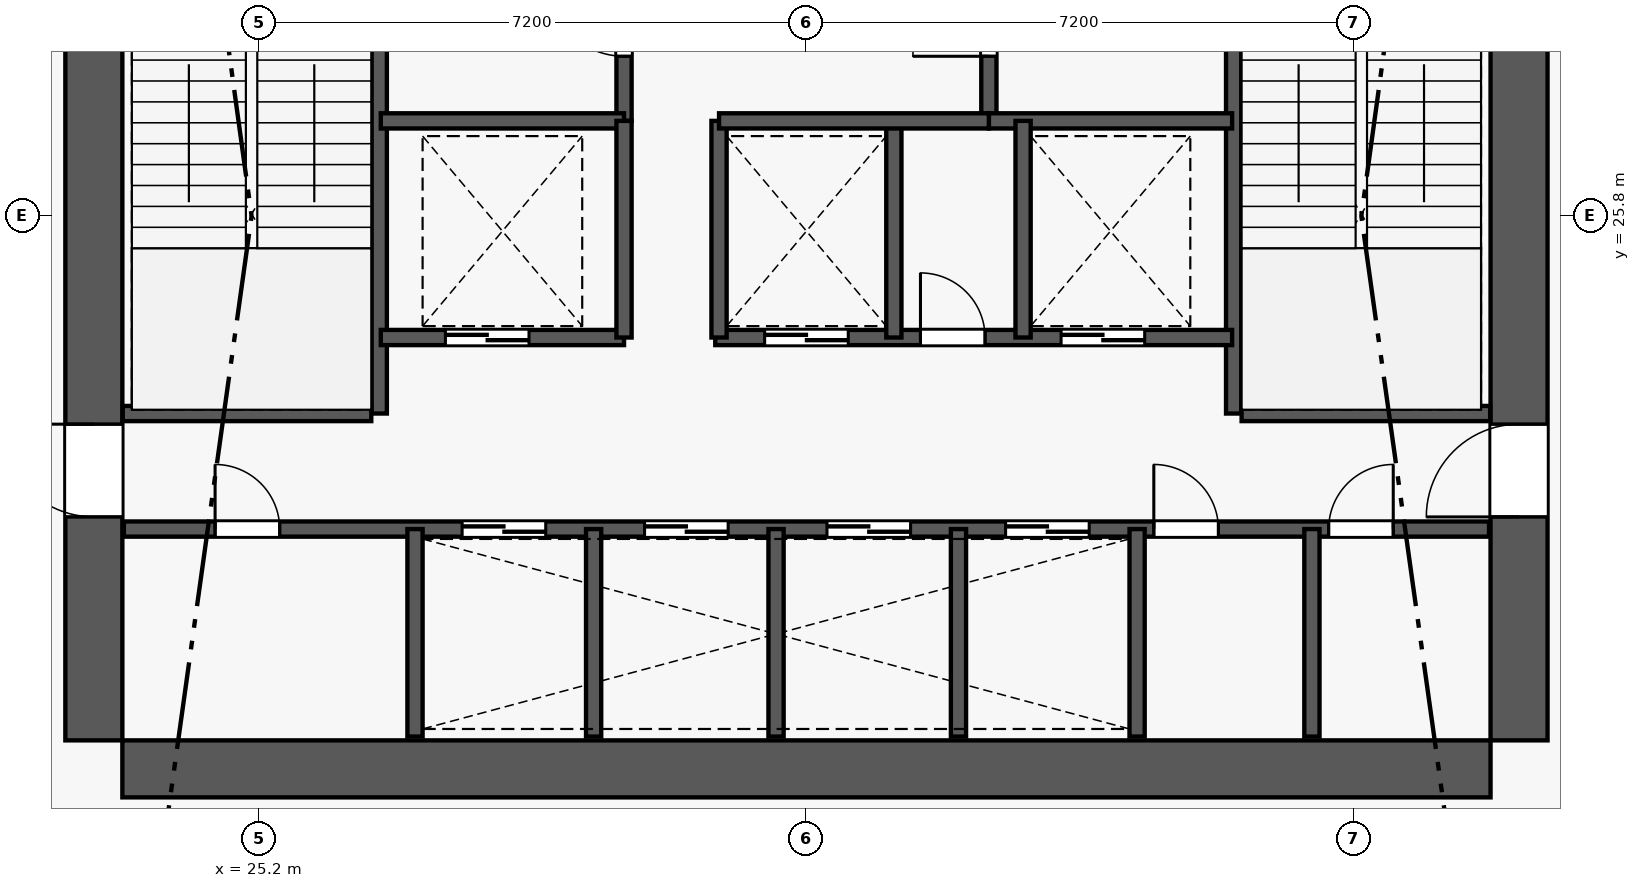
"""IFC4 building model, lengths in metres.
Left out: names, types, materials, properties, quantities, classifications, styles, units other than length and angle.
Written with IfcOpenShell. Run it as: python <this file> out.ifc"""

import sys

from ifc_helpers import new_model, si_unit, direction, frame, frame_2d, origin, origin_2d, place, context, subcontext, project, spatial, rectangle, extrude, element, fill, save


model = new_model("IFC4")
c1 = context("Model", 3, precision=1e-05, world=origin(), true_north=direction((0.0, 1.0)))
c2 = subcontext(c1, "Body", "Model", "MODEL_VIEW")
j1 = project(units=[si_unit("LENGTHUNIT", "METRE"), si_unit("PLANEANGLEUNIT", "RADIAN")], contexts=[c1])
p1 = place(None, origin())
s1 = spatial("IfcSite", under=j1, at=p1, CompositionType="ELEMENT")
p2 = place(p1, origin())
s2 = spatial("IfcBuilding", under=s1, at=p2, CompositionType="ELEMENT")
p3 = place(p2, frame((0.0, 0.0, 94.2)))
s3 = spatial("IfcBuildingStorey", under=s2, at=p3, CompositionType="ELEMENT", Elevation=94.2)
for number, where, z_axis, x_axis in (
    (1, (23.025, 18.525, 0.0), (0.0, 0.0, 1.0), (1.0, 0.0, 0.0)),
    (2, (41.775, 18.525, 0.0), (0.0, 0.0, 1.0), (1.0, 0.0, 0.0)),
):
    element("IfcColumn", number, at=place(p3, frame(where, z_axis=z_axis, x_axis=x_axis)), inside=s3, PredefinedType="COLUMN", context=c2, shape_type="SweptSolid", body=[
        extrude(rectangle(XDim=0.75, YDim=0.75, at=origin_2d()), origin(), (0.0, 0.0, 1.0), 4.2),
    ])
p4 = place(p3, frame((23.4, 18.525, 0.0), z_axis=(0.0, 0.0, 1.0), x_axis=(1.0, 0.0, 0.0)))
e3 = element("IfcWall", 3, at=p4, inside=s3, PredefinedType="SHEAR", context=c2, shape_type="SweptSolid", body=[
    extrude(rectangle(XDim=18.0, YDim=0.75, at=frame_2d((9.0, 0.0))), origin(), (0.0, 0.0, 1.0), 3.99),
])
p5 = place(p3, frame((23.025, 18.9, 0.0), z_axis=(0.0, 0.0, 1.0), x_axis=(0.0, 1.0, 0.0)))
e4 = element("IfcWall", 4, at=p5, inside=s3, PredefinedType="SHEAR", context=c2, shape_type="SweptSolid", body=[
    extrude(rectangle(XDim=14.0, YDim=0.75, at=frame_2d((7.0, 0.0))), origin(), (0.0, 0.0, 1.0), 3.99),
])
p6 = place(p5, frame((2.94, 0.0, 0.0)))
e5 = element("IfcOpeningElement", 5, at=p6, cuts=e4, PredefinedType="OPENING", context=c2, shape_type="SweptSolid", body=[
    extrude(rectangle(XDim=1.22, YDim=2.25, at=frame_2d((0.61, 1.125))), frame((0.0, 0.385, 0.0), z_axis=(0.0, -1.0, 0.0), x_axis=(1.0, 0.0, 0.0)), (0.0, 0.0, 1.0), 0.77),
])
p7 = place(p3, frame((41.775, 18.9, 0.0), z_axis=(0.0, 0.0, 1.0), x_axis=(0.0, 1.0, 0.0)))
e6 = element("IfcWall", 6, at=p7, inside=s3, PredefinedType="SHEAR", context=c2, shape_type="SweptSolid", body=[
    extrude(rectangle(XDim=14.0, YDim=0.75, at=frame_2d((7.0, 0.0))), origin(), (0.0, 0.0, 1.0), 3.99),
])
p8 = place(p7, frame((2.94, 0.0, 0.0)))
e7 = element("IfcOpeningElement", 7, at=p8, cuts=e6, PredefinedType="OPENING", context=c2, shape_type="SweptSolid", body=[
    extrude(rectangle(XDim=1.22, YDim=2.25, at=frame_2d((0.61, 1.125))), frame((0.0, 0.385, 0.0), z_axis=(0.0, -1.0, 0.0), x_axis=(1.0, 0.0, 0.0)), (0.0, 0.0, 1.0), 0.77),
])
p9 = place(p3, frame((26.78, 23.2, 0.0), z_axis=(0.0, 0.0, 1.0), x_axis=(0.0, 1.0, 0.0)))
e8 = element("IfcWall", 8, at=p9, inside=s3, PredefinedType="SHEAR", context=c2, shape_type="SweptSolid", body=[
    extrude(rectangle(XDim=6.78, YDim=0.2, at=frame_2d((3.39, 0.0))), origin(), (0.0, 0.0, 1.0), 4.2),
])
p10 = place(p9, frame((5.32, 0.0, 0.0)))
e9 = element("IfcOpeningElement", 9, at=p10, cuts=e8, PredefinedType="OPENING", context=c2, shape_type="SweptSolid", body=[
    extrude(rectangle(XDim=1.05, YDim=2.15, at=frame_2d((0.525, 1.075))), frame((0.0, 0.11, 0.0), z_axis=(0.0, -1.0, 0.0), x_axis=(1.0, 0.0, 0.0)), (0.0, 0.0, 1.0), 0.22),
])
p11 = place(p3, frame((23.405, 23.2, 0.0), z_axis=(0.0, 0.0, 1.0), x_axis=(1.0, 0.0, 0.0)))
e10 = element("IfcWall", 10, at=p11, inside=s3, PredefinedType="PLUMBINGWALL", context=c2, shape_type="SweptSolid", body=[
    extrude(rectangle(XDim=3.27, YDim=0.2, at=frame_2d((1.635, 0.0))), origin(), (0.0, 0.0, 1.0), 3.99),
])
p12 = place(p3, frame((38.02, 23.2, 0.0), z_axis=(0.0, 0.0, 1.0), x_axis=(0.0, 1.0, 0.0)))
e11 = element("IfcWall", 11, at=p12, inside=s3, PredefinedType="SHEAR", context=c2, shape_type="SweptSolid", body=[
    extrude(rectangle(XDim=6.78, YDim=0.2, at=frame_2d((3.39, 0.0))), origin(), (0.0, 0.0, 1.0), 4.2),
])
p13 = place(p12, frame((5.32, 0.0, 0.0)))
e12 = element("IfcOpeningElement", 12, at=p13, cuts=e11, PredefinedType="OPENING", context=c2, shape_type="SweptSolid", body=[
    extrude(rectangle(XDim=1.05, YDim=2.15, at=frame_2d((0.525, 1.075))), frame((0.0, 0.11, 0.0), z_axis=(0.0, -1.0, 0.0), x_axis=(1.0, 0.0, 0.0)), (0.0, 0.0, 1.0), 0.22),
])
p14 = place(p3, frame((38.125, 23.2, 0.0), z_axis=(0.0, 0.0, 1.0), x_axis=(1.0, 0.0, 0.0)))
e13 = element("IfcWall", 13, at=p14, inside=s3, PredefinedType="PLUMBINGWALL", context=c2, shape_type="SweptSolid", body=[
    extrude(rectangle(XDim=3.27, YDim=0.2, at=frame_2d((1.635, 0.0))), origin(), (0.0, 0.0, 1.0), 3.99),
])
p15 = place(p3, frame((30.0, 27.05, 0.0), z_axis=(0.0, 0.0, 1.0), x_axis=(0.0, 1.0, 0.0)))
e14 = element("IfcWall", 14, at=p15, inside=s3, PredefinedType="PLUMBINGWALL", context=c2, shape_type="SweptSolid", body=[
    extrude(rectangle(XDim=2.75, YDim=0.2, at=frame_2d((1.375, 0.0))), origin(), (0.0, 0.0, 1.0), 3.99),
])
p16 = place(p15, frame((0.85, 0.0, 0.0)))
e15 = element("IfcOpeningElement", 15, at=p16, cuts=e14, PredefinedType="OPENING", context=c2, shape_type="SweptSolid", body=[
    extrude(rectangle(XDim=1.0, YDim=2.15, at=frame_2d((0.5, 1.075))), frame((0.0, 0.11, 0.0), z_axis=(0.0, -1.0, 0.0), x_axis=(1.0, 0.0, 0.0)), (0.0, 0.0, 1.0), 0.22),
])
p17 = place(p3, frame((26.8, 27.05, 0.0), z_axis=(0.0, 0.0, 1.0), x_axis=(1.0, 0.0, 0.0)))
e16 = element("IfcWall", 16, at=p17, inside=s3, PredefinedType="PLUMBINGWALL", context=c2, shape_type="SweptSolid", body=[
    extrude(rectangle(XDim=3.2, YDim=0.2, at=frame_2d((1.6, 0.0))), origin(), (0.0, 0.0, 1.0), 3.99),
])
p18 = place(p3, frame((34.8, 27.05, 0.0), z_axis=(0.0, 0.0, 1.0), x_axis=(0.0, 1.0, 0.0)))
e17 = element("IfcWall", 17, at=p18, inside=s3, PredefinedType="PLUMBINGWALL", context=c2, shape_type="SweptSolid", body=[
    extrude(rectangle(XDim=2.75, YDim=0.2, at=frame_2d((1.375, 0.0))), origin(), (0.0, 0.0, 1.0), 3.99),
])
p19 = place(p18, frame((0.85, 0.0, 0.0)))
e18 = element("IfcOpeningElement", 18, at=p19, cuts=e17, PredefinedType="OPENING", context=c2, shape_type="SweptSolid", body=[
    extrude(rectangle(XDim=1.0, YDim=2.15, at=frame_2d((0.5, 1.075))), frame((0.0, 0.11, 0.0), z_axis=(0.0, -1.0, 0.0), x_axis=(1.0, 0.0, 0.0)), (0.0, 0.0, 1.0), 0.22),
])
p20 = place(p3, frame((34.8, 27.05, 0.0), z_axis=(0.0, 0.0, 1.0), x_axis=(1.0, 0.0, 0.0)))
e19 = element("IfcWall", 19, at=p20, inside=s3, PredefinedType="PLUMBINGWALL", context=c2, shape_type="SweptSolid", body=[
    extrude(rectangle(XDim=3.2, YDim=0.2, at=frame_2d((1.6, 0.0))), origin(), (0.0, 0.0, 1.0), 3.99),
])
p21 = place(p3, frame((26.8, 24.2, 0.0), z_axis=(0.0, 0.0, 1.0), x_axis=(1.0, 0.0, 0.0)))
e20 = element("IfcWall", 20, at=p21, inside=s3, PredefinedType="PLUMBINGWALL", context=c2, shape_type="SweptSolid", body=[
    extrude(rectangle(XDim=3.2, YDim=0.2, at=frame_2d((1.6, 0.0))), origin(), (0.0, 0.0, 1.0), 3.99),
])
p22 = place(p21, frame((0.85, 0.0, 0.0)))
e21 = element("IfcOpeningElement", 21, at=p22, cuts=e20, PredefinedType="OPENING", context=c2, shape_type="SweptSolid", body=[
    extrude(rectangle(XDim=1.1, YDim=2.2, at=frame_2d((0.55, 1.1))), frame((0.0, 0.11, 0.0), z_axis=(0.0, -1.0, 0.0), x_axis=(1.0, 0.0, 0.0)), (0.0, 0.0, 1.0), 0.22),
])
p23 = place(p3, frame((30.0, 24.2, 0.0), z_axis=(0.0, 0.0, 1.0), x_axis=(0.0, 1.0, 0.0)))
e22 = element("IfcWall", 22, at=p23, inside=s3, PredefinedType="PLUMBINGWALL", context=c2, shape_type="SweptSolid", body=[
    extrude(rectangle(XDim=2.85, YDim=0.2, at=frame_2d((1.425, 0.0))), origin(), (0.0, 0.0, 1.0), 3.99),
])
p24 = place(p3, frame((31.2, 24.2, 0.0), z_axis=(0.0, 0.0, 1.0), x_axis=(1.0, 0.0, 0.0)))
e23 = element("IfcWall", 23, at=p24, inside=s3, PredefinedType="PLUMBINGWALL", context=c2, shape_type="SweptSolid", body=[
    extrude(rectangle(XDim=6.8, YDim=0.2, at=frame_2d((3.4, 0.0))), origin(), (0.0, 0.0, 1.0), 3.99),
])
p25 = place(p24, frame((0.65, 0.0, 0.0)))
e24 = element("IfcOpeningElement", 24, at=p25, cuts=e23, PredefinedType="OPENING", context=c2, shape_type="SweptSolid", body=[
    extrude(rectangle(XDim=1.1, YDim=2.2, at=frame_2d((0.55, 1.1))), frame((0.0, 0.11, 0.0), z_axis=(0.0, -1.0, 0.0), x_axis=(1.0, 0.0, 0.0)), (0.0, 0.0, 1.0), 0.22),
])
p26 = place(p24, frame((2.7, 0.0, 0.0)))
e25 = element("IfcOpeningElement", 25, at=p26, cuts=e23, PredefinedType="OPENING", context=c2, shape_type="SweptSolid", body=[
    extrude(rectangle(XDim=0.85, YDim=2.05, at=frame_2d((0.425, 1.025))), frame((0.0, 0.11, 0.0), z_axis=(0.0, -1.0, 0.0), x_axis=(1.0, 0.0, 0.0)), (0.0, 0.0, 1.0), 0.22),
])
p27 = place(p24, frame((4.55, 0.0, 0.0)))
e26 = element("IfcOpeningElement", 26, at=p27, cuts=e23, PredefinedType="OPENING", context=c2, shape_type="SweptSolid", body=[
    extrude(rectangle(XDim=1.1, YDim=2.2, at=frame_2d((0.55, 1.1))), frame((0.0, 0.11, 0.0), z_axis=(0.0, -1.0, 0.0), x_axis=(1.0, 0.0, 0.0)), (0.0, 0.0, 1.0), 0.22),
])
for number, where, z_axis, x_axis in (
    (27, (31.25, 24.2, 0.0), (0.0, 0.0, 1.0), (0.0, 1.0, 0.0)),
    (28, (33.55, 24.2, 0.0), (0.0, 0.0, 1.0), (0.0, 1.0, 0.0)),
    (29, (35.25, 24.2, 0.0), (0.0, 0.0, 1.0), (0.0, 1.0, 0.0)),
):
    element("IfcWall", number, at=place(p3, frame(where, z_axis=z_axis, x_axis=x_axis)), inside=s3, PredefinedType="PLUMBINGWALL", context=c2, shape_type="SweptSolid", body=[
        extrude(rectangle(XDim=2.85, YDim=0.2, at=frame_2d((1.425, 0.0))), origin(), (0.0, 0.0, 1.0), 3.99),
    ])
p28 = place(p3, frame((31.25, 27.05, 0.0), z_axis=(0.0, 0.0, 1.0), x_axis=(1.0, 0.0, 0.0)))
e30 = element("IfcWall", 30, at=p28, inside=s3, PredefinedType="PLUMBINGWALL", context=c2, shape_type="SweptSolid", body=[
    extrude(rectangle(XDim=3.55, YDim=0.2, at=frame_2d((1.775, 0.0))), origin(), (0.0, 0.0, 1.0), 3.99),
])
p29 = place(p3, frame((23.42, 21.68, 0.0), z_axis=(0.0, 0.0, 1.0), x_axis=(1.0, 0.0, 0.0)))
e31 = element("IfcWall", 31, at=p29, inside=s3, PredefinedType="PLUMBINGWALL", context=c2, shape_type="SweptSolid", body=[
    extrude(rectangle(XDim=17.96, YDim=0.2, at=frame_2d((8.98, 0.0))), origin(), (0.0, 0.0, 1.0), 3.99),
])
p30 = place(p29, frame((4.45, 0.0, 0.0)))
e32 = element("IfcOpeningElement", 32, at=p30, cuts=e31, PredefinedType="OPENING", context=c2, shape_type="SweptSolid", body=[
    extrude(rectangle(XDim=1.1, YDim=2.2, at=frame_2d((0.55, 1.1))), frame((0.0, 0.11, 0.0), z_axis=(0.0, -1.0, 0.0), x_axis=(1.0, 0.0, 0.0)), (0.0, 0.0, 1.0), 0.22),
])
p31 = place(p29, frame((6.85, 0.0, 0.0)))
e33 = element("IfcOpeningElement", 33, at=p31, cuts=e31, PredefinedType="OPENING", context=c2, shape_type="SweptSolid", body=[
    extrude(rectangle(XDim=1.1, YDim=2.2, at=frame_2d((0.55, 1.1))), frame((0.0, 0.11, 0.0), z_axis=(0.0, -1.0, 0.0), x_axis=(1.0, 0.0, 0.0)), (0.0, 0.0, 1.0), 0.22),
])
p32 = place(p29, frame((9.25, 0.0, 0.0)))
e34 = element("IfcOpeningElement", 34, at=p32, cuts=e31, PredefinedType="OPENING", context=c2, shape_type="SweptSolid", body=[
    extrude(rectangle(XDim=1.1, YDim=2.2, at=frame_2d((0.55, 1.1))), frame((0.0, 0.11, 0.0), z_axis=(0.0, -1.0, 0.0), x_axis=(1.0, 0.0, 0.0)), (0.0, 0.0, 1.0), 0.22),
])
p33 = place(p29, frame((11.6, 0.0, 0.0)))
e35 = element("IfcOpeningElement", 35, at=p33, cuts=e31, PredefinedType="OPENING", context=c2, shape_type="SweptSolid", body=[
    extrude(rectangle(XDim=1.1, YDim=2.2, at=frame_2d((0.55, 1.1))), frame((0.0, 0.11, 0.0), z_axis=(0.0, -1.0, 0.0), x_axis=(1.0, 0.0, 0.0)), (0.0, 0.0, 1.0), 0.22),
])
p34 = place(p29, frame((1.2, 0.0, 0.0)))
e36 = element("IfcOpeningElement", 36, at=p34, cuts=e31, PredefinedType="OPENING", context=c2, shape_type="SweptSolid", body=[
    extrude(rectangle(XDim=0.85, YDim=2.05, at=frame_2d((0.425, 1.025))), frame((0.0, 0.11, 0.0), z_axis=(0.0, -1.0, 0.0), x_axis=(1.0, 0.0, 0.0)), (0.0, 0.0, 1.0), 0.22),
])
p35 = place(p29, frame((13.55, 0.0, 0.0)))
e37 = element("IfcOpeningElement", 37, at=p35, cuts=e31, PredefinedType="OPENING", context=c2, shape_type="SweptSolid", body=[
    extrude(rectangle(XDim=0.85, YDim=2.05, at=frame_2d((0.425, 1.025))), frame((0.0, 0.11, 0.0), z_axis=(0.0, -1.0, 0.0), x_axis=(1.0, 0.0, 0.0)), (0.0, 0.0, 1.0), 0.22),
])
p36 = place(p29, frame((15.85, 0.0, 0.0)))
e38 = element("IfcOpeningElement", 38, at=p36, cuts=e31, PredefinedType="OPENING", context=c2, shape_type="SweptSolid", body=[
    extrude(rectangle(XDim=0.85, YDim=2.05, at=frame_2d((0.425, 1.025))), frame((0.0, 0.11, 0.0), z_axis=(0.0, -1.0, 0.0), x_axis=(1.0, 0.0, 0.0)), (0.0, 0.0, 1.0), 0.22),
])
for number, where, z_axis, x_axis in (
    (39, (27.25, 18.95, 0.0), (0.0, 0.0, 1.0), (0.0, 1.0, 0.0)),
    (40, (29.6, 18.95, 0.0), (0.0, 0.0, 1.0), (0.0, 1.0, 0.0)),
    (41, (32.0, 18.95, 0.0), (0.0, 0.0, 1.0), (0.0, 1.0, 0.0)),
    (42, (34.4, 18.95, 0.0), (0.0, 0.0, 1.0), (0.0, 1.0, 0.0)),
    (43, (36.75, 18.95, 0.0), (0.0, 0.0, 1.0), (0.0, 1.0, 0.0)),
    (44, (39.05, 18.95, 0.0), (0.0, 0.0, 1.0), (0.0, 1.0, 0.0)),
):
    element("IfcWall", number, at=place(p3, frame(where, z_axis=z_axis, x_axis=x_axis)), inside=s3, PredefinedType="PLUMBINGWALL", context=c2, shape_type="SweptSolid", body=[
        extrude(rectangle(XDim=2.73, YDim=0.2, at=frame_2d((1.365, 0.0))), origin(), (0.0, 0.0, 1.0), 3.99),
    ])
p37 = place(p6, origin())
e45 = element("IfcDoor", 45, at=p37, inside=s3, OperationType="SINGLE_SWING_RIGHT", PredefinedType="DOOR", context=c2, shape_type="SweptSolid", body=[
    extrude(rectangle(XDim=1.22, YDim=2.25, at=frame_2d((0.61, 1.125))), frame((0.0, 0.025, 0.0), z_axis=(0.0, -1.0, 0.0), x_axis=(1.0, 0.0, 0.0)), (0.0, 0.0, 1.0), 0.05),
])
fill(e5, e45)
p38 = place(p8, origin())
e46 = element("IfcDoor", 46, at=p38, inside=s3, OperationType="SINGLE_SWING_LEFT", PredefinedType="DOOR", context=c2, shape_type="SweptSolid", body=[
    extrude(rectangle(XDim=1.22, YDim=2.25, at=frame_2d((0.61, 1.125))), frame((0.0, 0.025, 0.0), z_axis=(0.0, -1.0, 0.0), x_axis=(1.0, 0.0, 0.0)), (0.0, 0.0, 1.0), 0.05),
])
fill(e7, e46)
p39 = place(p16, origin())
e47 = element("IfcDoor", 47, at=p39, inside=s3, OperationType="SINGLE_SWING_RIGHT", PredefinedType="DOOR", context=c2, shape_type="SweptSolid", body=[
    extrude(rectangle(XDim=1.0, YDim=2.15, at=frame_2d((0.5, 1.075))), frame((0.0, 0.025, 0.0), z_axis=(0.0, -1.0, 0.0), x_axis=(1.0, 0.0, 0.0)), (0.0, 0.0, 1.0), 0.05),
])
fill(e15, e47)
p40 = place(p19, origin())
e48 = element("IfcDoor", 48, at=p40, inside=s3, OperationType="SINGLE_SWING_LEFT", PredefinedType="DOOR", context=c2, shape_type="SweptSolid", body=[
    extrude(rectangle(XDim=1.0, YDim=2.15, at=frame_2d((0.5, 1.075))), frame((0.0, 0.025, 0.0), z_axis=(0.0, -1.0, 0.0), x_axis=(1.0, 0.0, 0.0)), (0.0, 0.0, 1.0), 0.05),
])
fill(e18, e48)
p41 = place(p22, origin())
e49 = element("IfcDoor", 49, at=p41, inside=s3, OperationType="DOUBLE_DOOR_SLIDING", PredefinedType="DOOR", context=c2, shape_type="SweptSolid", body=[
    extrude(rectangle(XDim=1.1, YDim=2.2, at=frame_2d((0.55, 1.1))), frame((0.0, 0.025, 0.0), z_axis=(0.0, -1.0, 0.0), x_axis=(1.0, 0.0, 0.0)), (0.0, 0.0, 1.0), 0.05),
])
fill(e21, e49)
p42 = place(p25, origin())
e50 = element("IfcDoor", 50, at=p42, inside=s3, OperationType="DOUBLE_DOOR_SLIDING", PredefinedType="DOOR", context=c2, shape_type="SweptSolid", body=[
    extrude(rectangle(XDim=1.1, YDim=2.2, at=frame_2d((0.55, 1.1))), frame((0.0, 0.025, 0.0), z_axis=(0.0, -1.0, 0.0), x_axis=(1.0, 0.0, 0.0)), (0.0, 0.0, 1.0), 0.05),
])
fill(e24, e50)
p43 = place(p26, origin())
e51 = element("IfcDoor", 51, at=p43, inside=s3, OperationType="SINGLE_SWING_LEFT", PredefinedType="DOOR", context=c2, shape_type="SweptSolid", body=[
    extrude(rectangle(XDim=0.85, YDim=2.05, at=frame_2d((0.425, 1.025))), frame((0.0, 0.025, 0.0), z_axis=(0.0, -1.0, 0.0), x_axis=(1.0, 0.0, 0.0)), (0.0, 0.0, 1.0), 0.05),
])
fill(e25, e51)
p44 = place(p27, origin())
e52 = element("IfcDoor", 52, at=p44, inside=s3, OperationType="DOUBLE_DOOR_SLIDING", PredefinedType="DOOR", context=c2, shape_type="SweptSolid", body=[
    extrude(rectangle(XDim=1.1, YDim=2.2, at=frame_2d((0.55, 1.1))), frame((0.0, 0.025, 0.0), z_axis=(0.0, -1.0, 0.0), x_axis=(1.0, 0.0, 0.0)), (0.0, 0.0, 1.0), 0.05),
])
fill(e26, e52)
p45 = place(p30, origin())
e53 = element("IfcDoor", 53, at=p45, inside=s3, OperationType="DOUBLE_DOOR_SLIDING", PredefinedType="DOOR", context=c2, shape_type="SweptSolid", body=[
    extrude(rectangle(XDim=1.1, YDim=2.2, at=frame_2d((0.55, 1.1))), frame((0.0, 0.025, 0.0), z_axis=(0.0, -1.0, 0.0), x_axis=(1.0, 0.0, 0.0)), (0.0, 0.0, 1.0), 0.05),
])
fill(e32, e53)
p46 = place(p31, origin())
e54 = element("IfcDoor", 54, at=p46, inside=s3, OperationType="DOUBLE_DOOR_SLIDING", PredefinedType="DOOR", context=c2, shape_type="SweptSolid", body=[
    extrude(rectangle(XDim=1.1, YDim=2.2, at=frame_2d((0.55, 1.1))), frame((0.0, 0.025, 0.0), z_axis=(0.0, -1.0, 0.0), x_axis=(1.0, 0.0, 0.0)), (0.0, 0.0, 1.0), 0.05),
])
fill(e33, e54)
p47 = place(p32, origin())
e55 = element("IfcDoor", 55, at=p47, inside=s3, OperationType="DOUBLE_DOOR_SLIDING", PredefinedType="DOOR", context=c2, shape_type="SweptSolid", body=[
    extrude(rectangle(XDim=1.1, YDim=2.2, at=frame_2d((0.55, 1.1))), frame((0.0, 0.025, 0.0), z_axis=(0.0, -1.0, 0.0), x_axis=(1.0, 0.0, 0.0)), (0.0, 0.0, 1.0), 0.05),
])
fill(e34, e55)
p48 = place(p33, origin())
e56 = element("IfcDoor", 56, at=p48, inside=s3, OperationType="DOUBLE_DOOR_SLIDING", PredefinedType="DOOR", context=c2, shape_type="SweptSolid", body=[
    extrude(rectangle(XDim=1.1, YDim=2.2, at=frame_2d((0.55, 1.1))), frame((0.0, 0.025, 0.0), z_axis=(0.0, -1.0, 0.0), x_axis=(1.0, 0.0, 0.0)), (0.0, 0.0, 1.0), 0.05),
])
fill(e35, e56)
p49 = place(p34, origin())
e57 = element("IfcDoor", 57, at=p49, inside=s3, OperationType="SINGLE_SWING_LEFT", PredefinedType="DOOR", context=c2, shape_type="SweptSolid", body=[
    extrude(rectangle(XDim=0.85, YDim=2.05, at=frame_2d((0.425, 1.025))), frame((0.0, 0.025, 0.0), z_axis=(0.0, -1.0, 0.0), x_axis=(1.0, 0.0, 0.0)), (0.0, 0.0, 1.0), 0.05),
])
fill(e36, e57)
p50 = place(p35, origin())
e58 = element("IfcDoor", 58, at=p50, inside=s3, OperationType="SINGLE_SWING_LEFT", PredefinedType="DOOR", context=c2, shape_type="SweptSolid", body=[
    extrude(rectangle(XDim=0.85, YDim=2.05, at=frame_2d((0.425, 1.025))), frame((0.0, 0.025, 0.0), z_axis=(0.0, -1.0, 0.0), x_axis=(1.0, 0.0, 0.0)), (0.0, 0.0, 1.0), 0.05),
])
fill(e37, e58)
p51 = place(p36, origin())
e59 = element("IfcDoor", 59, at=p51, inside=s3, OperationType="SINGLE_SWING_RIGHT", PredefinedType="DOOR", context=c2, shape_type="SweptSolid", body=[
    extrude(rectangle(XDim=0.85, YDim=2.05, at=frame_2d((0.425, 1.025))), frame((0.0, 0.025, 0.0), z_axis=(0.0, -1.0, 0.0), x_axis=(1.0, 0.0, 0.0)), (0.0, 0.0, 1.0), 0.05),
])
fill(e38, e59)
save(model, sys.argv[1])
